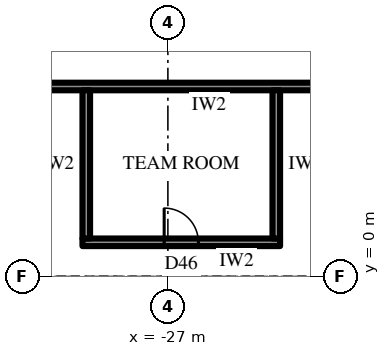
"""IFC4 building model, lengths in metres.
Left out: names, types, materials, properties, quantities, classifications, styles, units other than length and angle.
Written with IfcOpenShell. Run it as: python <this file> out.ifc"""

import sys

from ifc_helpers import new_model, si_unit, direction, frame, frame_2d, origin, place, context, subcontext, project, spatial, rectangle, extrude, element, fill, save


model = new_model("IFC4")
c1 = context("Model", 3, precision=1e-05, world=origin(), true_north=direction((0.0, 1.0)))
c2 = subcontext(c1, "Body", "Model", "MODEL_VIEW")
j1 = project(units=[si_unit("LENGTHUNIT", "METRE"), si_unit("PLANEANGLEUNIT", "RADIAN")], contexts=[c1])
p1 = place(None, origin())
s1 = spatial("IfcSite", under=j1, at=p1, CompositionType="ELEMENT")
p2 = place(p1, origin())
s2 = spatial("IfcBuilding", under=s1, at=p2, CompositionType="ELEMENT")
p3 = place(p2, frame((0.0, 0.0, 186.7)))
s3 = spatial("IfcBuildingStorey", under=s2, at=p3, CompositionType="ELEMENT", Elevation=186.7)
p4 = place(p3, frame((-18.6, 5.0, 0.0), z_axis=(0.0, 0.0, 1.0), x_axis=(-1.0, 0.0, 0.0)))
e1 = element("IfcWall", 1, at=p4, inside=s3, PredefinedType="PARTITIONING", context=c2, shape_type="SweptSolid", body=[
    extrude(rectangle(XDim=14.632, YDim=0.2, at=frame_2d((7.316, 0.0))), origin(), (0.0, 0.0, 1.0), 4.0),
])
p5 = place(p4, frame((0.963, 0.0, 0.0)))
e2 = element("IfcOpeningElement", 2, at=p5, cuts=e1, PredefinedType="OPENING", context=c2, shape_type="SweptSolid", body=[
    extrude(rectangle(XDim=1.0, YDim=2.2, at=frame_2d((0.5, 1.1))), frame((0.0, 0.11, 0.0), z_axis=(0.0, -1.0, 0.0), x_axis=(1.0, 0.0, 0.0)), (0.0, 0.0, 1.0), 0.22),
])
p6 = place(p3, frame((-24.048, 0.9, 0.0), z_axis=(0.0, 0.0, 1.0), x_axis=(-1.0, 0.0, 0.0)))
e3 = element("IfcWall", 3, at=p6, inside=s3, PredefinedType="PARTITIONING", context=c2, shape_type="SweptSolid", body=[
    extrude(rectangle(XDim=5.2, YDim=0.2, at=frame_2d((2.6, 0.0))), origin(), (0.0, 0.0, 1.0), 4.0),
])
p7 = place(p6, frame((2.15, 0.0, 0.0)))
e4 = element("IfcOpeningElement", 4, at=p7, cuts=e3, PredefinedType="OPENING", context=c2, shape_type="SweptSolid", body=[
    extrude(rectangle(XDim=0.9, YDim=2.2, at=frame_2d((0.45, 1.1))), frame((0.0, 0.11, 0.0), z_axis=(0.0, -1.0, 0.0), x_axis=(1.0, 0.0, 0.0)), (0.0, 0.0, 1.0), 0.22),
])
for number, where, z_axis, x_axis in (
    (5, (-24.148, 4.9, 0.0), (0.0, 0.0, 1.0), (0.0, -1.0, 0.0)),
    (6, (-29.148, 4.9, 0.0), (0.0, 0.0, 1.0), (0.0, -1.0, 0.0)),
):
    element("IfcWall", number, at=place(p3, frame(where, z_axis=z_axis, x_axis=x_axis)), inside=s3, PredefinedType="PARTITIONING", context=c2, shape_type="SweptSolid", body=[
        extrude(rectangle(XDim=3.9, YDim=0.2, at=frame_2d((1.95, 0.0))), origin(), (0.0, 0.0, 1.0), 4.0),
    ])
p8 = place(p7, frame((0.9, 0.0, 0.0), z_axis=(0.0, 0.0, 1.0), x_axis=(-1.0, 0.0, 0.0)))
e7 = element("IfcDoor", 7, at=p8, inside=s3, OperationType="SINGLE_SWING_RIGHT", PredefinedType="DOOR", context=c2, shape_type="SweptSolid", body=[
    extrude(rectangle(XDim=0.9, YDim=2.2, at=frame_2d((0.45, 1.1))), frame((0.0, 0.025, 0.0), z_axis=(0.0, -1.0, 0.0), x_axis=(1.0, 0.0, 0.0)), (0.0, 0.0, 1.0), 0.05),
])
fill(e4, e7)
save(model, sys.argv[1])
